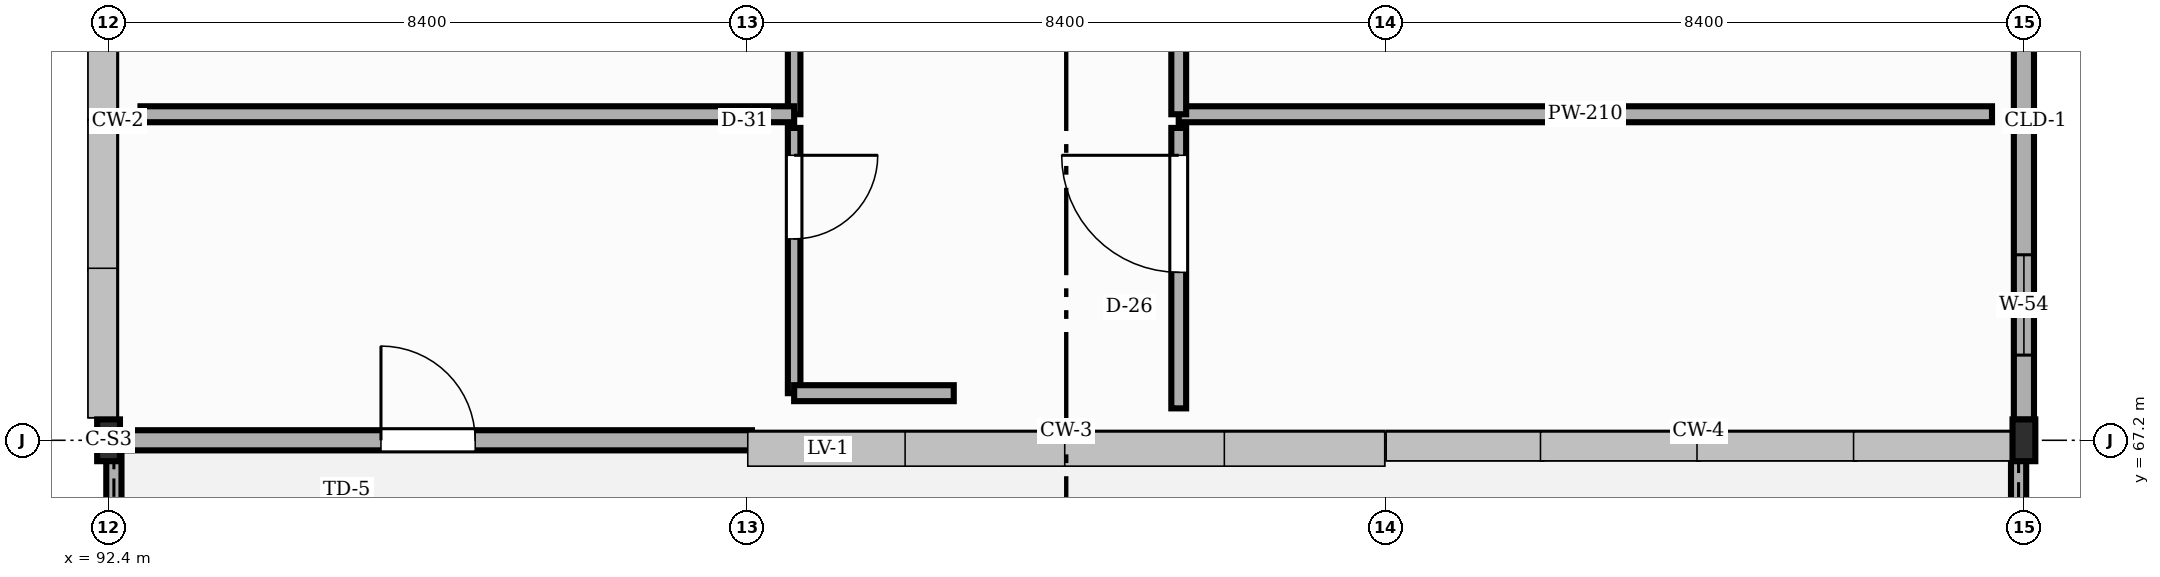
"""IFC4 building model, lengths in metres.
Left out: names, types, materials, properties, quantities, classifications, styles, units other than length and angle.
Written with IfcOpenShell. Run it as: python <this file> out.ifc"""

import sys

from ifc_helpers import new_model, si_unit, direction, frame, frame_2d, origin, origin_2d, place, context, subcontext, project, spatial, rectangle, i_section, extrude, element, fill, save


model = new_model("IFC4")
c1 = context("Model", 3, precision=1e-05, world=origin(), true_north=direction((0.0, 1.0)))
c2 = subcontext(c1, "Body", "Model", "MODEL_VIEW")
j1 = project(units=[si_unit("LENGTHUNIT", "METRE"), si_unit("PLANEANGLEUNIT", "RADIAN")], contexts=[c1])
p1 = place(None, origin())
s1 = spatial("IfcSite", under=j1, at=p1, CompositionType="ELEMENT")
p2 = place(p1, origin())
s2 = spatial("IfcBuilding", under=s1, at=p2, CompositionType="ELEMENT")
p3 = place(p2, frame((0.0, 0.0, 18.0)))
s3 = spatial("IfcBuildingStorey", under=s2, at=p3, CompositionType="ELEMENT", Elevation=18.0)
for number, where, z_axis, x_axis in (
    (1, (92.4, 67.2, 0.0), (0.0, 0.0, 1.0), (1.0, 0.0, 0.0)),
    (2, (117.6, 67.2, 0.0), (0.0, 0.0, 1.0), (1.0, 0.0, 0.0)),
):
    element("IfcColumn", number, at=place(p3, frame(where, z_axis=z_axis, x_axis=x_axis)), inside=s3, PredefinedType="COLUMN", context=c2, shape_type="SweptSolid", body=[
        extrude(i_section(OverallWidth=0.3, OverallDepth=0.55, WebThickness=0.015, FlangeThickness=0.029, FilletRadius=0.027, at=origin_2d()), origin(), (0.0, 0.0, 1.0), 4.05),
    ])
p4 = place(p3, frame((92.408, 67.2, 0.0), z_axis=(0.0, 0.0, 1.0), x_axis=(1.0, 0.0, 0.0)))
e3 = element("IfcWall", 3, at=p4, inside=s3, PredefinedType="STANDARD", context=c2, shape_type="SweptSolid", body=[
    extrude(rectangle(XDim=8.457, YDim=0.265, at=frame_2d((4.229, 0.0))), origin(), (0.0, 0.0, 1.0), 2.852),
])
p5 = place(p4, frame((3.576, 0.0, 0.0)))
e4 = element("IfcOpeningElement", 4, at=p5, cuts=e3, PredefinedType="OPENING", context=c2, shape_type="SweptSolid", body=[
    extrude(rectangle(XDim=1.24, YDim=2.16, at=frame_2d((0.62, 1.08))), frame((0.0, 0.142, 0.0), z_axis=(0.0, -1.0, 0.0), x_axis=(1.0, 0.0, 0.0)), (0.0, 0.0, 1.0), 0.285),
])
p6 = place(p3, frame((117.6, 67.471, 0.0), z_axis=(0.0, 0.0, 1.0), x_axis=(0.0, 1.0, 0.0)))
e5 = element("IfcWall", 5, at=p6, inside=s3, PredefinedType="STANDARD", context=c2, shape_type="SweptSolid", body=[
    extrude(rectangle(XDim=7.858, YDim=0.265, at=frame_2d((3.929, 0.0))), origin(), (0.0, 0.0, 1.0), 3.492),
])
p7 = place(p6, frame((0.85, 0.0, 0.9)))
e6 = element("IfcOpeningElement", 6, at=p7, cuts=e5, PredefinedType="OPENING", context=c2, shape_type="SweptSolid", body=[
    extrude(rectangle(XDim=1.32, YDim=2.05, at=frame_2d((0.66, 1.025))), frame((0.0, 0.142, 0.0), z_axis=(0.0, -1.0, 0.0), x_axis=(1.0, 0.0, 0.0)), (0.0, 0.0, 1.0), 0.285),
])
p8 = place(p6, frame((5.588, 0.0, 0.9)))
e7 = element("IfcOpeningElement", 7, at=p8, cuts=e5, PredefinedType="OPENING", context=c2, shape_type="SweptSolid", body=[
    extrude(rectangle(XDim=1.42, YDim=2.05, at=frame_2d((0.71, 1.025))), frame((0.0, 0.142, 0.0), z_axis=(0.0, -1.0, 0.0), x_axis=(1.0, 0.0, 0.0)), (0.0, 0.0, 1.0), 0.285),
])
for number, where, z_axis, x_axis in (
    (8, (117.53, 62.06, 0.0), (0.0, 0.0, 1.0), (0.0, 1.0, 0.0)),
    (9, (92.47, 67.06, 0.0), (0.0, 0.0, 1.0), (0.0, -1.0, 0.0)),
):
    element("IfcWall", number, at=place(p3, frame(where, z_axis=z_axis, x_axis=x_axis)), inside=s3, PredefinedType="PARAPET", context=c2, shape_type="SweptSolid", body=[
        extrude(rectangle(XDim=5.0, YDim=0.2, at=frame_2d((2.5, 0.0))), origin(), (0.0, 0.0, 1.0), 0.22),
    ])
p9 = place(p3, frame((117.18, 71.49, -0.004), z_axis=(0.0, 0.0, 1.0), x_axis=(-1.0, 0.0, 0.0)))
e10 = element("IfcWall", 10, at=p9, inside=s3, PredefinedType="STANDARD", context=c2, shape_type="SweptSolid", body=[
    extrude(rectangle(XDim=10.7, YDim=0.21, at=frame_2d((5.35, 0.0))), origin(), (0.0, 0.0, 1.0), 3.854),
])
p10 = place(p3, frame((106.48, 71.49, -0.004), z_axis=(0.0, 0.0, 1.0), x_axis=(0.0, 1.0, 0.0)))
e11 = element("IfcWall", 11, at=p10, inside=s3, PredefinedType="STANDARD", context=c2, shape_type="SweptSolid", body=[
    extrude(rectangle(XDim=6.69, YDim=0.195, at=frame_2d((3.345, 0.0))), origin(), (0.0, 0.0, 1.0), 3.854),
])
p11 = place(p3, frame((101.42, 81.61, -0.004), z_axis=(0.0, 0.0, 1.0), x_axis=(0.0, -1.0, 0.0)))
e12 = element("IfcWall", 12, at=p11, inside=s3, PredefinedType="STANDARD", context=c2, shape_type="SweptSolid", body=[
    extrude(rectangle(XDim=10.12, YDim=0.165, at=frame_2d((5.06, 0.0))), origin(), (0.0, 0.0, 1.0), 3.854),
])
p12 = place(p11, frame((1.474, 0.0, 0.0)))
e13 = element("IfcOpeningElement", 13, at=p12, cuts=e12, PredefinedType="OPENING", context=c2, shape_type="SweptSolid", body=[
    extrude(rectangle(XDim=1.1, YDim=2.22, at=frame_2d((0.55, 1.11))), frame((0.0, 0.093, 0.0), z_axis=(0.0, -1.0, 0.0), x_axis=(1.0, 0.0, 0.0)), (0.0, 0.0, 1.0), 0.185),
])
p13 = place(p3, frame((101.42, 71.49, -0.004), z_axis=(0.0, 0.0, 1.0), x_axis=(-1.0, 0.0, 0.0)))
e14 = element("IfcWall", 14, at=p13, inside=s3, PredefinedType="STANDARD", context=c2, shape_type="SweptSolid", body=[
    extrude(rectangle(XDim=8.6, YDim=0.21, at=frame_2d((4.3, 0.0))), origin(), (0.0, 0.0, 1.0), 3.854),
])
p14 = place(p3, frame((106.48, 67.62, -0.004), z_axis=(0.0, 0.0, 1.0), x_axis=(0.0, 1.0, 0.0)))
e15 = element("IfcWall", 15, at=p14, inside=s3, PredefinedType="STANDARD", context=c2, shape_type="SweptSolid", body=[
    extrude(rectangle(XDim=3.69, YDim=0.195, at=frame_2d((1.845, 0.0))), origin(), (0.0, 0.0, 1.0), 3.854),
])
p15 = place(p14, frame((1.79, 0.0, 0.0)))
e16 = element("IfcOpeningElement", 16, at=p15, cuts=e15, PredefinedType="OPENING", context=c2, shape_type="SweptSolid", body=[
    extrude(rectangle(XDim=1.54, YDim=2.22, at=frame_2d((0.77, 1.11))), frame((0.0, 0.107, 0.0), z_axis=(0.0, -1.0, 0.0), x_axis=(1.0, 0.0, 0.0)), (0.0, 0.0, 1.0), 0.215),
])
p16 = place(p3, frame((101.42, 71.31, -0.004), z_axis=(0.0, 0.0, 1.0), x_axis=(0.0, -1.0, 0.0)))
e17 = element("IfcWall", 17, at=p16, inside=s3, PredefinedType="STANDARD", context=c2, shape_type="SweptSolid", body=[
    extrude(rectangle(XDim=3.49, YDim=0.165, at=frame_2d((1.745, 0.0))), origin(), (0.0, 0.0, 1.0), 3.854),
])
p17 = place(p16, frame((0.36, 0.0, 0.0)))
e18 = element("IfcOpeningElement", 18, at=p17, cuts=e17, PredefinedType="OPENING", context=c2, shape_type="SweptSolid", body=[
    extrude(rectangle(XDim=1.1, YDim=2.3, at=frame_2d((0.55, 1.15))), frame((0.0, 0.093, 0.0), z_axis=(0.0, -1.0, 0.0), x_axis=(1.0, 0.0, 0.0)), (0.0, 0.0, 1.0), 0.185),
])
p18 = place(p3, frame((101.42, 67.82, -0.004), z_axis=(0.0, 0.0, 1.0), x_axis=(1.0, 0.0, 0.0)))
e19 = element("IfcWall", 19, at=p18, inside=s3, PredefinedType="STANDARD", context=c2, shape_type="SweptSolid", body=[
    extrude(rectangle(XDim=2.1, YDim=0.21, at=frame_2d((1.05, 0.0))), origin(), (0.0, 0.0, 1.0), 3.854),
])
p19 = place(p5, origin())
e20 = element("IfcDoor", 20, at=p19, inside=s3, OperationType="SINGLE_SWING_LEFT", PredefinedType="DOOR", context=c2, shape_type="SweptSolid", body=[
    extrude(rectangle(XDim=1.24, YDim=2.16, at=frame_2d((0.62, 1.08))), frame((0.0, 0.025, 0.0), z_axis=(0.0, -1.0, 0.0), x_axis=(1.0, 0.0, 0.0)), (0.0, 0.0, 1.0), 0.05),
])
fill(e4, e20)
p20 = place(p7, origin())
e21 = element("IfcWindow", 21, at=p20, inside=s3, PartitioningType="SINGLE_PANEL", PredefinedType="WINDOW", context=c2, shape_type="SweptSolid", body=[
    extrude(rectangle(XDim=1.32, YDim=2.05, at=frame_2d((0.66, 1.025))), frame((0.0, 0.03, 0.0), z_axis=(0.0, -1.0, 0.0), x_axis=(1.0, 0.0, 0.0)), (0.0, 0.0, 1.0), 0.06),
])
fill(e6, e21)
p21 = place(p15, origin())
e22 = element("IfcDoor", 22, at=p21, inside=s3, OperationType="SINGLE_SWING_RIGHT", PredefinedType="DOOR", context=c2, shape_type="SweptSolid", body=[
    extrude(rectangle(XDim=1.54, YDim=2.22, at=frame_2d((0.77, 1.11))), frame((0.0, 0.025, 0.0), z_axis=(0.0, -1.0, 0.0), x_axis=(1.0, 0.0, 0.0)), (0.0, 0.0, 1.0), 0.05),
])
fill(e16, e22)
p22 = place(p17, origin())
e23 = element("IfcDoor", 23, at=p22, inside=s3, OperationType="SINGLE_SWING_LEFT", PredefinedType="DOOR", context=c2, shape_type="SweptSolid", body=[
    extrude(rectangle(XDim=1.1, YDim=2.3, at=frame_2d((0.55, 1.15))), frame((0.0, 0.025, 0.0), z_axis=(0.0, -1.0, 0.0), x_axis=(1.0, 0.0, 0.0)), (0.0, 0.0, 1.0), 0.05),
])
fill(e18, e23)
save(model, sys.argv[1])
